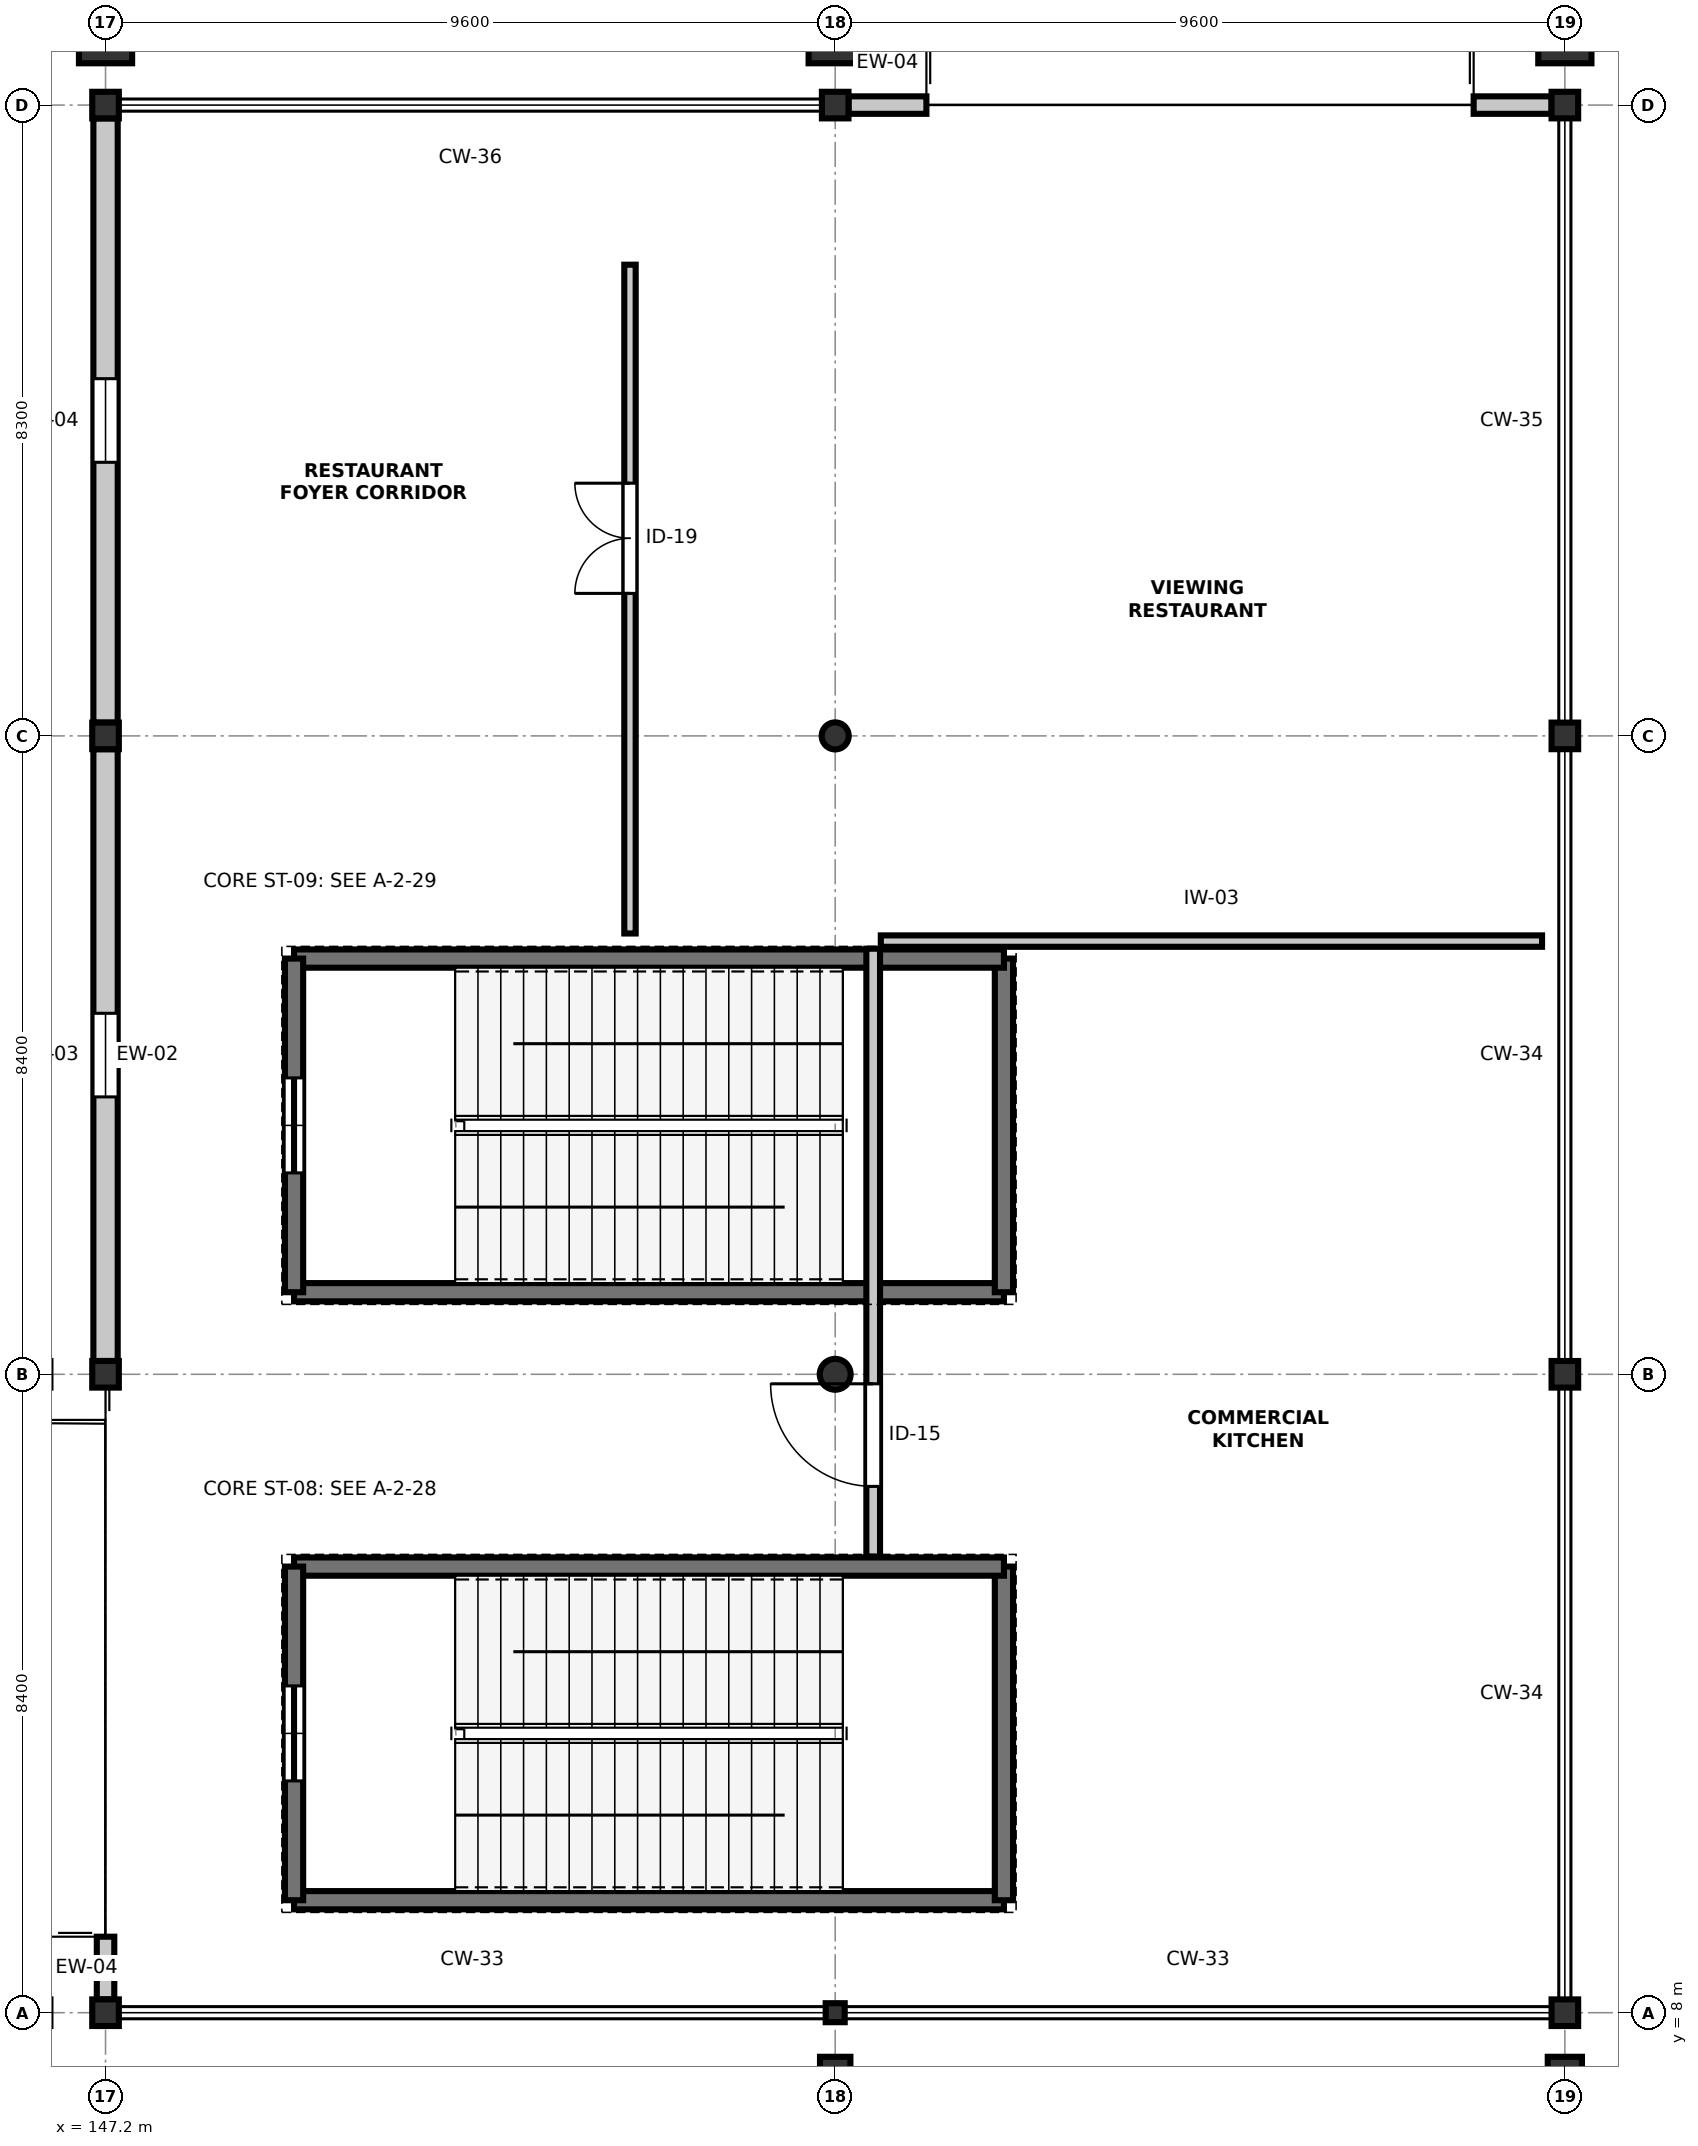
"""IFC4 building model, lengths in metres.
Left out: names, types, materials, properties, quantities, classifications, styles, units other than length and angle.
Written with IfcOpenShell. Run it as: python <this file> out.ifc"""

import sys

from ifc_helpers import new_model, si_unit, direction, frame, frame_2d, origin, origin_2d, place, context, subcontext, project, spatial, rectangle, hollow_circle, i_section, extrude, element, fill, save


model = new_model("IFC4")
c1 = context("Model", 3, precision=1e-05, world=origin(), true_north=direction((0.0, 1.0)))
c2 = subcontext(c1, "Body", "Model", "MODEL_VIEW")
j1 = project(units=[si_unit("LENGTHUNIT", "METRE"), si_unit("PLANEANGLEUNIT", "RADIAN")], contexts=[c1])
p1 = place(None, origin())
s1 = spatial("IfcSite", under=j1, at=p1, CompositionType="ELEMENT")
p2 = place(p1, origin())
s2 = spatial("IfcBuilding", under=s1, at=p2, CompositionType="ELEMENT")
p3 = place(p2, frame((0.0, 0.0, 19.2)))
s3 = spatial("IfcBuildingStorey", under=s2, at=p3, CompositionType="ELEMENT", Elevation=19.2)
for number, where, z_axis, x_axis in (
    (1, (147.2, 8.0, 0.0), (0.0, 0.0, 1.0), (1.0, 0.0, 0.0)),
    (2, (147.2, 16.4, 0.0), (0.0, 0.0, 1.0), (1.0, 0.0, 0.0)),
    (3, (147.2, 24.8, 0.0), (0.0, 0.0, 1.0), (1.0, 0.0, 0.0)),
    (4, (147.2, 33.1, 0.0), (0.0, 0.0, 1.0), (1.0, 0.0, 0.0)),
):
    element("IfcColumn", number, at=place(p3, frame(where, z_axis=z_axis, x_axis=x_axis)), inside=s3, PredefinedType="COLUMN", context=c2, shape_type="SweptSolid", body=[
        extrude(i_section(OverallWidth=0.35, OverallDepth=0.35, WebThickness=0.012, FlangeThickness=0.019, FilletRadius=0.02, at=origin_2d()), origin(), (0.0, 0.0, 1.0), 5.4),
    ])
p4 = place(p3, frame((156.8, 8.0, 0.0), z_axis=(0.0, 0.0, 1.0), x_axis=(1.0, 0.0, 0.0)))
e5 = element("IfcColumn", 5, at=p4, inside=s3, PredefinedType="COLUMN", context=c2, shape_type="SweptSolid", body=[
    extrude(i_section(OverallWidth=0.25, OverallDepth=0.25, WebThickness=0.009, FlangeThickness=0.014, FilletRadius=0.016, at=origin_2d()), origin(), (0.0, 0.0, 1.0), 5.4),
])
p5 = place(p3, frame((156.8, 7.095, 0.0), z_axis=(0.0, 0.0, 1.0), x_axis=(1.0, 0.0, 0.0)))
e6 = element("IfcColumn", 6, at=p5, inside=s3, PredefinedType="PILASTER", context=c2, shape_type="SweptSolid", body=[
    extrude(rectangle(XDim=0.4, YDim=0.65, at=origin_2d()), origin(), (0.0, 0.0, 1.0), 5.4),
])
p6 = place(p3, frame((156.8, 16.4, 0.0), z_axis=(0.0, 0.0, 1.0), x_axis=(1.0, 0.0, 0.0)))
e7 = element("IfcColumn", 7, at=p6, inside=s3, PredefinedType="COLUMN", context=c2, shape_type="SweptSolid", body=[
    extrude(hollow_circle(Radius=0.203, WallThickness=0.016, at=origin_2d()), origin(), (0.0, 0.0, 1.0), 5.4),
])
p7 = place(p3, frame((156.8, 24.8, 0.0), z_axis=(0.0, 0.0, 1.0), x_axis=(1.0, 0.0, 0.0)))
e8 = element("IfcColumn", 8, at=p7, inside=s3, PredefinedType="COLUMN", context=c2, shape_type="SweptSolid", body=[
    extrude(hollow_circle(Radius=0.178, WallThickness=0.012, at=origin_2d()), origin(), (0.0, 0.0, 1.0), 5.4),
])
for number, where, z_axis, x_axis in (
    (9, (156.8, 33.1, 0.0), (0.0, 0.0, 1.0), (1.0, 0.0, 0.0)),
    (10, (166.4, 8.0, 0.0), (0.0, 0.0, 1.0), (1.0, 0.0, 0.0)),
):
    element("IfcColumn", number, at=place(p3, frame(where, z_axis=z_axis, x_axis=x_axis)), inside=s3, PredefinedType="COLUMN", context=c2, shape_type="SweptSolid", body=[
        extrude(i_section(OverallWidth=0.35, OverallDepth=0.35, WebThickness=0.012, FlangeThickness=0.019, FilletRadius=0.02, at=origin_2d()), origin(), (0.0, 0.0, 1.0), 5.4),
    ])
p8 = place(p3, frame((166.4, 7.045, 0.0), z_axis=(0.0, 0.0, 1.0), x_axis=(1.0, 0.0, 0.0)))
e11 = element("IfcColumn", 11, at=p8, inside=s3, PredefinedType="PILASTER", context=c2, shape_type="SweptSolid", body=[
    extrude(rectangle(XDim=0.45, YDim=0.75, at=origin_2d()), origin(), (0.0, 0.0, 1.0), 5.4),
])
for number, where, z_axis, x_axis in (
    (12, (166.4, 16.4, 0.0), (0.0, 0.0, 1.0), (1.0, 0.0, 0.0)),
    (13, (166.4, 24.8, 0.0), (0.0, 0.0, 1.0), (1.0, 0.0, 0.0)),
    (14, (166.4, 33.1, 0.0), (0.0, 0.0, 1.0), (1.0, 0.0, 0.0)),
):
    element("IfcColumn", number, at=place(p3, frame(where, z_axis=z_axis, x_axis=x_axis)), inside=s3, PredefinedType="COLUMN", context=c2, shape_type="SweptSolid", body=[
        extrude(i_section(OverallWidth=0.35, OverallDepth=0.35, WebThickness=0.012, FlangeThickness=0.019, FilletRadius=0.02, at=origin_2d()), origin(), (0.0, 0.0, 1.0), 5.4),
    ])
for number, where, z_axis, x_axis in (
    (15, (147.2, 34.0, 0.0), (0.0, 0.0, 1.0), (1.0, 0.0, 0.0)),
    (16, (156.8, 34.0, 0.0), (0.0, 0.0, 1.0), (1.0, 0.0, 0.0)),
    (17, (166.4, 34.0, 0.0), (0.0, 0.0, 1.0), (1.0, 0.0, 0.0)),
):
    element("IfcColumn", number, at=place(p3, frame(where, z_axis=z_axis, x_axis=x_axis)), inside=s3, PredefinedType="COLUMN", context=c2, shape_type="SweptSolid", body=[
        extrude(rectangle(XDim=0.7, YDim=0.7, at=origin_2d()), origin(), (0.0, 0.0, 1.0), 5.4),
    ])
p9 = place(p3, frame((156.975, 33.1, 0.0), z_axis=(0.0, 0.0, 1.0), x_axis=(1.0, 0.0, 0.0)))
e18 = element("IfcWall", 18, at=p9, inside=s3, PredefinedType="STANDARD", context=c2, shape_type="SweptSolid", body=[
    extrude(rectangle(XDim=1.025, YDim=0.23, at=frame_2d((0.512, 0.0))), origin(), (0.0, 0.0, 1.0), 4.657),
])
p10 = place(p3, frame((165.2, 33.1, 0.0), z_axis=(0.0, 0.0, 1.0), x_axis=(1.0, 0.0, 0.0)))
e19 = element("IfcWall", 19, at=p10, inside=s3, PredefinedType="STANDARD", context=c2, shape_type="SweptSolid", body=[
    extrude(rectangle(XDim=1.025, YDim=0.23, at=frame_2d((0.513, 0.0))), origin(), (0.0, 0.0, 1.0), 4.657),
])
p11 = place(p3, frame((147.2, 8.175, 0.0), z_axis=(0.0, 0.0, 1.0), x_axis=(0.0, 1.0, 0.0)))
e20 = element("IfcWall", 20, at=p11, inside=s3, PredefinedType="STANDARD", context=c2, shape_type="SweptSolid", body=[
    extrude(rectangle(XDim=0.825, YDim=0.23, at=frame_2d((0.413, 0.0))), origin(), (0.0, 0.0, 1.0), 4.755),
])
p12 = place(p3, frame((147.2, 24.625, 0.0), z_axis=(0.0, 0.0, 1.0), x_axis=(0.0, -1.0, 0.0)))
e21 = element("IfcWall", 21, at=p12, inside=s3, PredefinedType="STANDARD", context=c2, shape_type="SweptSolid", body=[
    extrude(rectangle(XDim=8.05, YDim=0.32, at=frame_2d((4.025, 0.0))), origin(), (0.0, 0.0, 1.0), 4.657),
])
p13 = place(p12, frame((3.475, 0.0, 0.95)))
e22 = element("IfcOpeningElement", 22, at=p13, cuts=e21, PredefinedType="OPENING", context=c2, shape_type="SweptSolid", body=[
    extrude(rectangle(XDim=1.1, YDim=1.95, at=frame_2d((0.55, 0.975))), frame((0.0, 0.17, 0.0), z_axis=(0.0, -1.0, 0.0), x_axis=(1.0, 0.0, 0.0)), (0.0, 0.0, 1.0), 0.34),
])
p14 = place(p3, frame((147.2, 32.925, 0.0), z_axis=(0.0, 0.0, 1.0), x_axis=(0.0, -1.0, 0.0)))
e23 = element("IfcWall", 23, at=p14, inside=s3, PredefinedType="STANDARD", context=c2, shape_type="SweptSolid", body=[
    extrude(rectangle(XDim=7.95, YDim=0.32, at=frame_2d((3.975, 0.0))), origin(), (0.0, 0.0, 1.0), 4.657),
])
p15 = place(p14, frame((3.425, 0.0, 0.95)))
e24 = element("IfcOpeningElement", 24, at=p15, cuts=e23, PredefinedType="OPENING", context=c2, shape_type="SweptSolid", body=[
    extrude(rectangle(XDim=1.1, YDim=2.15, at=frame_2d((0.55, 1.075))), frame((0.0, 0.17, 0.0), z_axis=(0.0, -1.0, 0.0), x_axis=(1.0, 0.0, 0.0)), (0.0, 0.0, 1.0), 0.34),
])
p16 = place(p3, frame((149.68, 9.48, 0.0), z_axis=(0.0, 0.0, 1.0), x_axis=(1.0, 0.0, 0.0)))
e25 = element("IfcWall", 25, at=p16, inside=s3, PredefinedType="SHEAR", context=c2, shape_type="SweptSolid", body=[
    extrude(rectangle(XDim=9.34, YDim=0.24, at=frame_2d((4.67, 0.0))), origin(), (0.0, 0.0, 1.0), 5.16),
])
p17 = place(p3, frame((159.02, 9.48, 0.0), z_axis=(0.0, 0.0, 1.0), x_axis=(0.0, 1.0, 0.0)))
e26 = element("IfcWall", 26, at=p17, inside=s3, PredefinedType="SHEAR", context=c2, shape_type="SweptSolid", body=[
    extrude(rectangle(XDim=4.39, YDim=0.24, at=frame_2d((2.195, 0.0))), origin(), (0.0, 0.0, 1.0), 5.16),
])
p18 = place(p3, frame((159.02, 13.87, 0.0), z_axis=(0.0, 0.0, 1.0), x_axis=(-1.0, 0.0, 0.0)))
e27 = element("IfcWall", 27, at=p18, inside=s3, PredefinedType="SHEAR", context=c2, shape_type="SweptSolid", body=[
    extrude(rectangle(XDim=9.34, YDim=0.24, at=frame_2d((4.67, 0.0))), origin(), (0.0, 0.0, 1.0), 5.16),
])
p19 = place(p3, frame((149.68, 13.87, 0.0), z_axis=(0.0, 0.0, 1.0), x_axis=(0.0, -1.0, 0.0)))
e28 = element("IfcWall", 28, at=p19, inside=s3, PredefinedType="SHEAR", context=c2, shape_type="SweptSolid", body=[
    extrude(rectangle(XDim=4.39, YDim=0.24, at=frame_2d((2.195, 0.0))), origin(), (0.0, 0.0, 1.0), 5.16),
])
p20 = place(p19, frame((1.57, 0.0, 0.0)))
e29 = element("IfcOpeningElement", 29, at=p20, cuts=e28, PredefinedType="OPENING", context=c2, shape_type="SweptSolid", body=[
    extrude(rectangle(XDim=1.25, YDim=2.2, at=frame_2d((0.625, 1.1))), frame((0.0, 0.13, 0.0), z_axis=(0.0, -1.0, 0.0), x_axis=(1.0, 0.0, 0.0)), (0.0, 0.0, 1.0), 0.26),
])
p21 = place(p3, frame((149.68, 17.48, 0.0), z_axis=(0.0, 0.0, 1.0), x_axis=(1.0, 0.0, 0.0)))
e30 = element("IfcWall", 30, at=p21, inside=s3, PredefinedType="SHEAR", context=c2, shape_type="SweptSolid", body=[
    extrude(rectangle(XDim=9.34, YDim=0.24, at=frame_2d((4.67, 0.0))), origin(), (0.0, 0.0, 1.0), 5.16),
])
p22 = place(p3, frame((159.02, 17.48, 0.0), z_axis=(0.0, 0.0, 1.0), x_axis=(0.0, 1.0, 0.0)))
e31 = element("IfcWall", 31, at=p22, inside=s3, PredefinedType="SHEAR", context=c2, shape_type="SweptSolid", body=[
    extrude(rectangle(XDim=4.39, YDim=0.24, at=frame_2d((2.195, 0.0))), origin(), (0.0, 0.0, 1.0), 5.16),
])
p23 = place(p3, frame((159.02, 21.87, 0.0), z_axis=(0.0, 0.0, 1.0), x_axis=(-1.0, 0.0, 0.0)))
e32 = element("IfcWall", 32, at=p23, inside=s3, PredefinedType="SHEAR", context=c2, shape_type="SweptSolid", body=[
    extrude(rectangle(XDim=9.34, YDim=0.24, at=frame_2d((4.67, 0.0))), origin(), (0.0, 0.0, 1.0), 5.16),
])
p24 = place(p3, frame((149.68, 21.87, 0.0), z_axis=(0.0, 0.0, 1.0), x_axis=(0.0, -1.0, 0.0)))
e33 = element("IfcWall", 33, at=p24, inside=s3, PredefinedType="SHEAR", context=c2, shape_type="SweptSolid", body=[
    extrude(rectangle(XDim=4.39, YDim=0.24, at=frame_2d((2.195, 0.0))), origin(), (0.0, 0.0, 1.0), 5.16),
])
p25 = place(p24, frame((1.57, 0.0, 0.0)))
e34 = element("IfcOpeningElement", 34, at=p25, cuts=e33, PredefinedType="OPENING", context=c2, shape_type="SweptSolid", body=[
    extrude(rectangle(XDim=1.25, YDim=2.2, at=frame_2d((0.625, 1.1))), frame((0.0, 0.13, 0.0), z_axis=(0.0, -1.0, 0.0), x_axis=(1.0, 0.0, 0.0)), (0.0, 0.0, 1.0), 0.26),
])
p26 = place(p3, frame((154.1, 22.2, 0.0), z_axis=(0.0, 0.0, 1.0), x_axis=(0.0, 1.0, 0.0)))
e35 = element("IfcWall", 35, at=p26, inside=s3, PredefinedType="PARTITIONING", context=c2, shape_type="SweptSolid", body=[
    extrude(rectangle(XDim=8.8, YDim=0.15, at=frame_2d((4.4, 0.0))), origin(), (0.0, 0.0, 1.0), 4.657),
])
p27 = place(p26, frame((4.475, 0.0, 0.0)))
e36 = element("IfcOpeningElement", 36, at=p27, cuts=e35, PredefinedType="OPENING", context=c2, shape_type="SweptSolid", body=[
    extrude(rectangle(XDim=1.45, YDim=2.22, at=frame_2d((0.725, 1.11))), frame((0.0, 0.085, 0.0), z_axis=(0.0, -1.0, 0.0), x_axis=(1.0, 0.0, 0.0)), (0.0, 0.0, 1.0), 0.17),
])
p28 = place(p3, frame((157.3, 14.0, 0.0), z_axis=(0.0, 0.0, 1.0), x_axis=(0.0, 1.0, 0.0)))
e37 = element("IfcWall", 37, at=p28, inside=s3, PredefinedType="PARTITIONING", context=c2, shape_type="SweptSolid", body=[
    extrude(rectangle(XDim=8.0, YDim=0.18, at=frame_2d((4.0, 0.0))), origin(), (0.0, 0.0, 1.0), 4.657),
])
p29 = place(p28, frame((0.925, 0.0, 0.0)))
e38 = element("IfcOpeningElement", 38, at=p29, cuts=e37, PredefinedType="OPENING", context=c2, shape_type="SweptSolid", body=[
    extrude(rectangle(XDim=1.35, YDim=2.2, at=frame_2d((0.675, 1.1))), frame((0.0, 0.1, 0.0), z_axis=(0.0, -1.0, 0.0), x_axis=(1.0, 0.0, 0.0)), (0.0, 0.0, 1.0), 0.2),
])
p30 = place(p3, frame((157.4, 22.1, 0.0), z_axis=(0.0, 0.0, 1.0), x_axis=(1.0, 0.0, 0.0)))
e39 = element("IfcWall", 39, at=p30, inside=s3, PredefinedType="PARTITIONING", context=c2, shape_type="SweptSolid", body=[
    extrude(rectangle(XDim=8.7, YDim=0.15, at=frame_2d((4.35, 0.0))), origin(), (0.0, 0.0, 1.0), 5.145),
])
p31 = place(p13, origin())
e40 = element("IfcWindow", 40, at=p31, inside=s3, PartitioningType="SINGLE_PANEL", PredefinedType="WINDOW", context=c2, shape_type="SweptSolid", body=[
    extrude(rectangle(XDim=1.1, YDim=1.95, at=frame_2d((0.55, 0.975))), frame((0.0, 0.03, 0.0), z_axis=(0.0, -1.0, 0.0), x_axis=(1.0, 0.0, 0.0)), (0.0, 0.0, 1.0), 0.06),
])
fill(e22, e40)
p32 = place(p15, origin())
e41 = element("IfcWindow", 41, at=p32, inside=s3, PartitioningType="SINGLE_PANEL", PredefinedType="WINDOW", context=c2, shape_type="SweptSolid", body=[
    extrude(rectangle(XDim=1.1, YDim=2.15, at=frame_2d((0.55, 1.075))), frame((0.0, 0.03, 0.0), z_axis=(0.0, -1.0, 0.0), x_axis=(1.0, 0.0, 0.0)), (0.0, 0.0, 1.0), 0.06),
])
fill(e24, e41)
p33 = place(p20, origin())
e42 = element("IfcDoor", 42, at=p33, inside=s3, OperationType="SINGLE_SWING_LEFT", PredefinedType="DOOR", context=c2, shape_type="SweptSolid", body=[
    extrude(rectangle(XDim=1.25, YDim=2.2, at=frame_2d((0.625, 1.1))), frame((0.0, 0.025, 0.0), z_axis=(0.0, -1.0, 0.0), x_axis=(1.0, 0.0, 0.0)), (0.0, 0.0, 1.0), 0.05),
])
fill(e29, e42)
p34 = place(p25, origin())
e43 = element("IfcDoor", 43, at=p34, inside=s3, OperationType="SINGLE_SWING_RIGHT", PredefinedType="DOOR", context=c2, shape_type="SweptSolid", body=[
    extrude(rectangle(XDim=1.25, YDim=2.2, at=frame_2d((0.625, 1.1))), frame((0.0, 0.025, 0.0), z_axis=(0.0, -1.0, 0.0), x_axis=(1.0, 0.0, 0.0)), (0.0, 0.0, 1.0), 0.05),
])
fill(e34, e43)
p35 = place(p27, origin())
e44 = element("IfcDoor", 44, at=p35, inside=s3, OperationType="DOUBLE_DOOR_SINGLE_SWING", PredefinedType="DOOR", context=c2, shape_type="SweptSolid", body=[
    extrude(rectangle(XDim=1.45, YDim=2.22, at=frame_2d((0.725, 1.11))), frame((0.0, 0.025, 0.0), z_axis=(0.0, -1.0, 0.0), x_axis=(1.0, 0.0, 0.0)), (0.0, 0.0, 1.0), 0.05),
])
fill(e36, e44)
p36 = place(p29, origin())
e45 = element("IfcDoor", 45, at=p36, inside=s3, OperationType="SINGLE_SWING_RIGHT", PredefinedType="DOOR", context=c2, shape_type="SweptSolid", body=[
    extrude(rectangle(XDim=1.35, YDim=2.2, at=frame_2d((0.675, 1.1))), frame((0.0, 0.025, 0.0), z_axis=(0.0, -1.0, 0.0), x_axis=(1.0, 0.0, 0.0)), (0.0, 0.0, 1.0), 0.05),
])
fill(e38, e45)
save(model, sys.argv[1])
